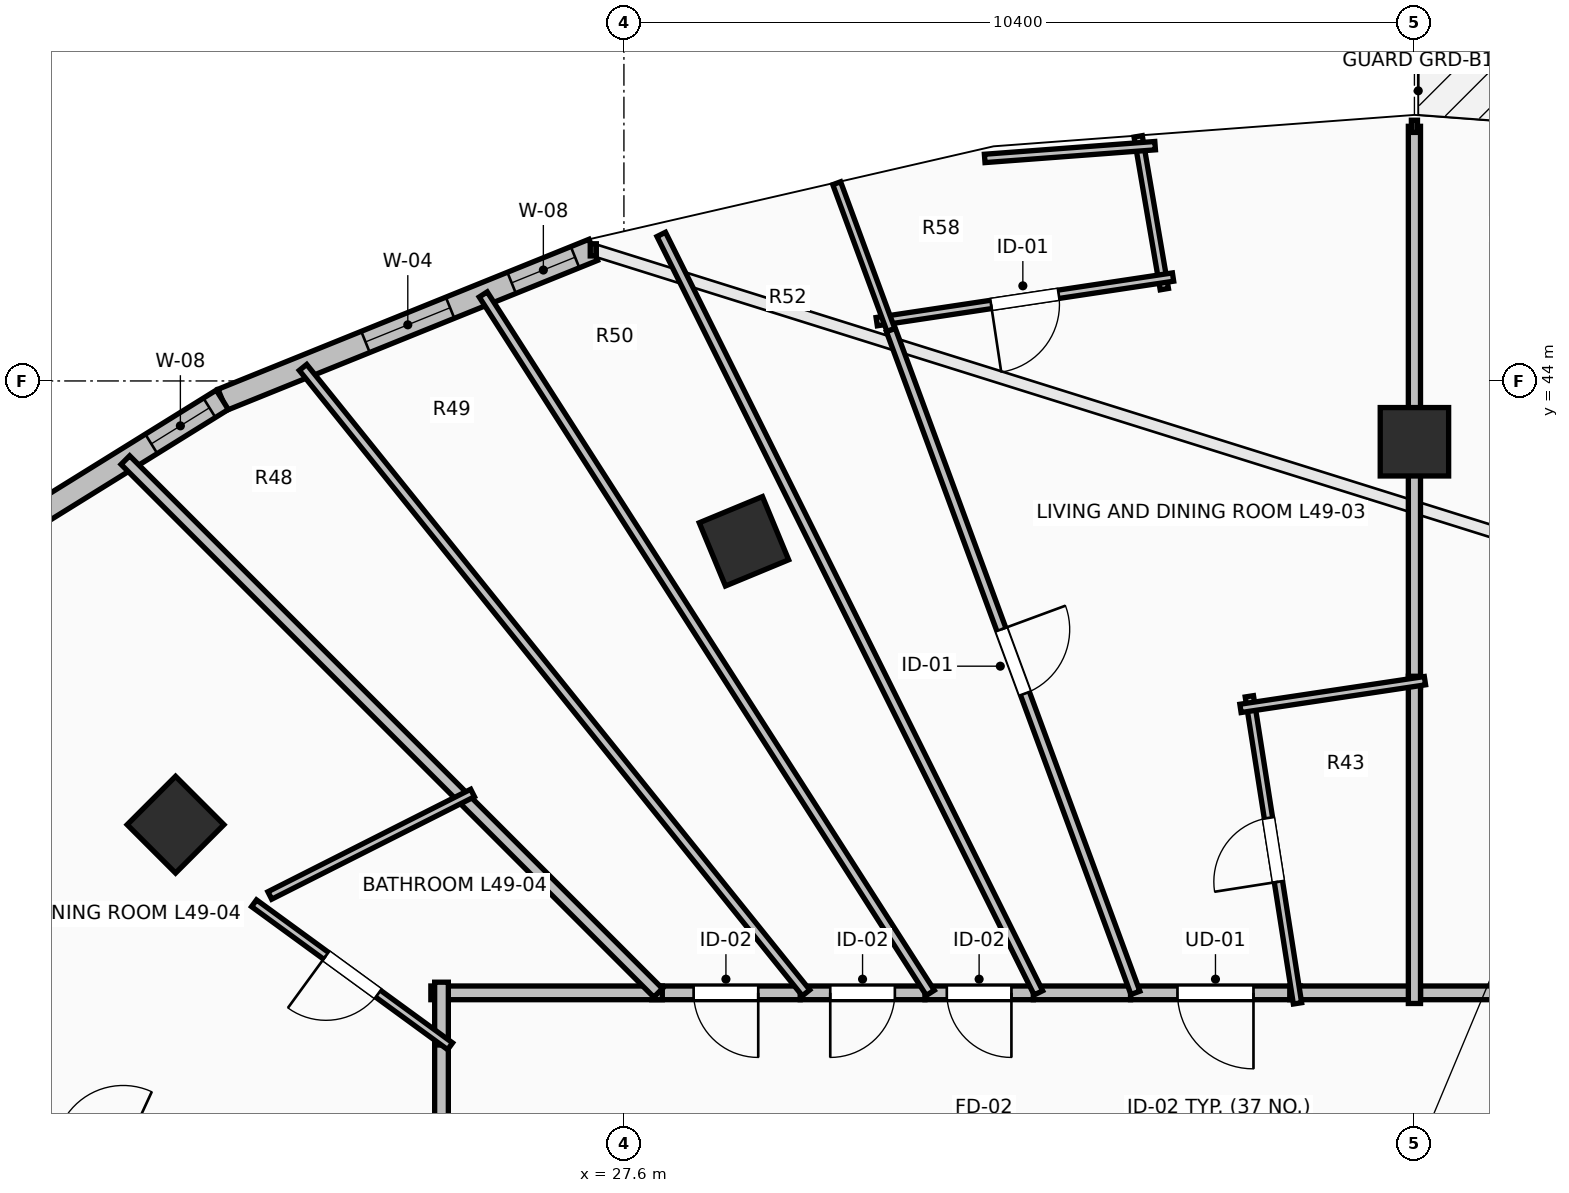
"""IFC4 building model, lengths in metres.
Left out: names, types, materials, properties, quantities, classifications, styles, units other than length and angle.
Written with IfcOpenShell. Run it as: python <this file> out.ifc"""

import sys

from ifc_helpers import new_model, si_unit, direction, frame, frame_2d, origin, origin_2d, place, context, subcontext, project, spatial, rectangle, extrude, element, fill, save


model = new_model("IFC4")
c1 = context("Model", 3, precision=1e-05, world=origin(), true_north=direction((0.0, 1.0)))
c2 = subcontext(c1, "Body", "Model", "MODEL_VIEW")
j1 = project(units=[si_unit("LENGTHUNIT", "METRE"), si_unit("PLANEANGLEUNIT", "RADIAN")], contexts=[c1])
p1 = place(None, origin())
s1 = spatial("IfcSite", under=j1, at=p1, CompositionType="ELEMENT")
p2 = place(p1, origin())
s2 = spatial("IfcBuilding", under=s1, at=p2, CompositionType="ELEMENT")
p3 = place(p2, frame((0.0, 0.0, 182.6)))
s3 = spatial("IfcBuildingStorey", under=s2, at=p3, CompositionType="ELEMENT", Elevation=182.6)
for number, where, z_axis, x_axis in (
    (1, (38.0, 43.2, 0.0), (0.0, 0.0, 1.0), (0.0, 1.0, 0.0)),
    (2, (29.179, 41.891, 0.0), (0.0, 0.0, 1.0), (-0.383, 0.924, 0.0)),
    (3, (21.701, 38.162, 0.0), (0.0, 0.0, 1.0), (-0.707, 0.707, 0.0)),
):
    element("IfcColumn", number, at=place(p3, frame(where, z_axis=z_axis, x_axis=x_axis)), inside=s3, PredefinedType="COLUMN", context=c2, shape_type="SweptSolid", body=[
        extrude(rectangle(XDim=0.9, YDim=0.9, at=origin_2d()), origin(), (0.0, 0.0, 1.0), 3.5),
    ])
p4 = place(p3, frame((27.197, 45.725, 0.0), z_axis=(0.0, 0.0, 1.0), x_axis=(-0.927111094334, -0.374786630981, 0.0)))
e4 = element("IfcWall", 4, at=p4, inside=s3, PredefinedType="STANDARD", context=c2, shape_type="SweptSolid", body=[
    extrude(rectangle(XDim=5.264, YDim=0.3, at=frame_2d((2.632, 0.0))), origin(), (0.0, 0.0, 1.0), 3.24),
])
p5 = place(p4, frame((0.258, 0.0, 0.85)))
e5 = element("IfcOpeningElement", 5, at=p5, cuts=e4, PredefinedType="OPENING", context=c2, shape_type="SweptSolid", body=[
    extrude(rectangle(XDim=0.9, YDim=1.8, at=frame_2d((0.45, 0.9))), frame((0.0, 0.165, 0.0), z_axis=(0.0, -1.0, 0.0), x_axis=(1.0, 0.0, 0.0)), (0.0, 0.0, 1.0), 0.33),
])
p6 = place(p4, frame((2.032, 0.0, 0.85)))
e6 = element("IfcOpeningElement", 6, at=p6, cuts=e4, PredefinedType="OPENING", context=c2, shape_type="SweptSolid", body=[
    extrude(rectangle(XDim=1.2, YDim=1.95, at=frame_2d((0.6, 0.975))), frame((0.0, 0.165, 0.0), z_axis=(0.0, -1.0, 0.0), x_axis=(1.0, 0.0, 0.0)), (0.0, 0.0, 1.0), 0.33),
])
p7 = place(p3, frame((22.316, 43.752, 0.0), z_axis=(0.0, 0.0, 1.0), x_axis=(-0.849647657754, -0.527350791858, 0.0)))
e7 = element("IfcWall", 7, at=p7, inside=s3, PredefinedType="STANDARD", context=c2, shape_type="SweptSolid", body=[
    extrude(rectangle(XDim=5.035, YDim=0.3, at=frame_2d((2.518, 0.0))), origin(), (0.0, 0.0, 1.0), 3.24),
])
p8 = place(p7, frame((0.199, 0.0, 0.85)))
e8 = element("IfcOpeningElement", 8, at=p8, cuts=e7, PredefinedType="OPENING", context=c2, shape_type="SweptSolid", body=[
    extrude(rectangle(XDim=0.9, YDim=1.8, at=frame_2d((0.45, 0.9))), frame((0.0, 0.165, 0.0), z_axis=(0.0, -1.0, 0.0), x_axis=(1.0, 0.0, 0.0)), (0.0, 0.0, 1.0), 0.33),
])
p9 = place(p3, frame((39.197, 35.95, 0.0), z_axis=(0.0, 0.0, 1.0), x_axis=(-1.0, 0.0, 0.0)))
e9 = element("IfcWall", 9, at=p9, inside=s3, PredefinedType="PARTITIONING", context=c2, shape_type="SweptSolid", body=[
    extrude(rectangle(XDim=1.257, YDim=0.18, at=frame_2d((0.628, 0.0))), origin(), (0.0, 0.0, 1.0), 2.922),
])
p10 = place(p3, frame((36.5, 35.95, 0.0), z_axis=(0.0, 0.0, 1.0), x_axis=(-1.0, 0.0, 0.0)))
e10 = element("IfcWall", 10, at=p10, inside=s3, PredefinedType="PARTITIONING", context=c2, shape_type="SweptSolid", body=[
    extrude(rectangle(XDim=2.235, YDim=0.18, at=frame_2d((1.118, 0.0))), origin(), (0.0, 0.0, 1.0), 2.922),
])
p11 = place(p10, frame((0.617, 0.0, 0.0)))
e11 = element("IfcOpeningElement", 11, at=p11, cuts=e10, PredefinedType="OPENING", context=c2, shape_type="SweptSolid", body=[
    extrude(rectangle(XDim=1.0, YDim=2.15, at=frame_2d((0.5, 1.075))), frame((0.0, 0.105, 0.0), z_axis=(0.0, -1.0, 0.0), x_axis=(1.0, 0.0, 0.0)), (0.0, 0.0, 1.0), 0.21),
])
p12 = place(p3, frame((38.08, 35.95, 0.0), z_axis=(0.0, 0.0, 1.0), x_axis=(-1.0, 0.0, 0.0)))
e12 = element("IfcWall", 12, at=p12, inside=s3, PredefinedType="PARTITIONING", context=c2, shape_type="SweptSolid", body=[
    extrude(rectangle(XDim=1.72, YDim=0.18, at=frame_2d((0.86, 0.0))), origin(), (0.0, 0.0, 1.0), 2.922),
])
p13 = place(p3, frame((34.265, 35.95, 0.0), z_axis=(0.0, 0.0, 1.0), x_axis=(-1.0, 0.0, 0.0)))
e13 = element("IfcWall", 13, at=p13, inside=s3, PredefinedType="PARTITIONING", context=c2, shape_type="SweptSolid", body=[
    extrude(rectangle(XDim=1.279, YDim=0.18, at=frame_2d((0.639, 0.0))), origin(), (0.0, 0.0, 1.0), 2.922),
])
p14 = place(p3, frame((32.986, 35.95, 0.0), z_axis=(0.0, 0.0, 1.0), x_axis=(-1.0, 0.0, 0.0)))
e14 = element("IfcWall", 14, at=p14, inside=s3, PredefinedType="PARTITIONING", context=c2, shape_type="SweptSolid", body=[
    extrude(rectangle(XDim=1.426, YDim=0.18, at=frame_2d((0.713, 0.0))), origin(), (0.0, 0.0, 1.0), 3.24),
])
p15 = place(p14, frame((0.288, 0.0, 0.0)))
e15 = element("IfcOpeningElement", 15, at=p15, cuts=e14, PredefinedType="OPENING", context=c2, shape_type="SweptSolid", body=[
    extrude(rectangle(XDim=0.85, YDim=2.1, at=frame_2d((0.425, 1.05))), frame((0.0, 0.105, 0.0), z_axis=(0.0, -1.0, 0.0), x_axis=(1.0, 0.0, 0.0)), (0.0, 0.0, 1.0), 0.21),
])
p16 = place(p3, frame((31.56, 35.95, 0.0), z_axis=(0.0, 0.0, 1.0), x_axis=(-1.0, 0.0, 0.0)))
e16 = element("IfcWall", 16, at=p16, inside=s3, PredefinedType="PARTITIONING", context=c2, shape_type="SweptSolid", body=[
    extrude(rectangle(XDim=1.641, YDim=0.18, at=frame_2d((0.821, 0.0))), origin(), (0.0, 0.0, 1.0), 2.432),
])
p17 = place(p16, frame((0.396, 0.0, 0.0)))
e17 = element("IfcOpeningElement", 17, at=p17, cuts=e16, PredefinedType="OPENING", context=c2, shape_type="SweptSolid", body=[
    extrude(rectangle(XDim=0.85, YDim=2.1, at=frame_2d((0.425, 1.05))), frame((0.0, 0.105, 0.0), z_axis=(0.0, -1.0, 0.0), x_axis=(1.0, 0.0, 0.0)), (0.0, 0.0, 1.0), 0.21),
])
p18 = place(p3, frame((29.919, 35.95, 0.0), z_axis=(0.0, 0.0, 1.0), x_axis=(-1.0, 0.0, 0.0)))
e18 = element("IfcWall", 18, at=p18, inside=s3, PredefinedType="PARTITIONING", context=c2, shape_type="SweptSolid", body=[
    extrude(rectangle(XDim=1.954, YDim=0.18, at=frame_2d((0.977, 0.0))), origin(), (0.0, 0.0, 1.0), 2.432),
])
p19 = place(p18, frame((0.552, 0.0, 0.0)))
e19 = element("IfcOpeningElement", 19, at=p19, cuts=e18, PredefinedType="OPENING", context=c2, shape_type="SweptSolid", body=[
    extrude(rectangle(XDim=0.85, YDim=2.1, at=frame_2d((0.425, 1.05))), frame((0.0, 0.105, 0.0), z_axis=(0.0, -1.0, 0.0), x_axis=(1.0, 0.0, 0.0)), (0.0, 0.0, 1.0), 0.21),
])
p20 = place(p3, frame((25.2, 35.404, 0.0), z_axis=(0.0, 0.0, 1.0), x_axis=(0.0, -1.0, 0.0)))
e20 = element("IfcWall", 20, at=p20, inside=s3, PredefinedType="PARTITIONING", context=c2, shape_type="SweptSolid", body=[
    extrude(rectangle(XDim=3.563, YDim=0.18, at=frame_2d((1.781, 0.0))), origin(), (0.0, 0.0, 1.0), 2.432),
])
p21 = place(p20, frame((1.281, 0.0, 0.0)))
e21 = element("IfcOpeningElement", 21, at=p21, cuts=e20, PredefinedType="OPENING", context=c2, shape_type="SweptSolid", body=[
    extrude(rectangle(XDim=1.0, YDim=2.15, at=frame_2d((0.5, 1.075))), frame((0.0, 0.105, 0.0), z_axis=(0.0, -1.0, 0.0), x_axis=(1.0, 0.0, 0.0)), (0.0, 0.0, 1.0), 0.21),
])
p22 = place(p3, frame((28.105, 35.95, 0.0), z_axis=(0.0, 0.0, 1.0), x_axis=(-1.0, 0.0, 0.0)))
e22 = element("IfcWall", 22, at=p22, inside=s3, PredefinedType="PARTITIONING", context=c2, shape_type="SweptSolid", body=[
    extrude(rectangle(XDim=3.045, YDim=0.18, at=frame_2d((1.522, 0.0))), origin(), (0.0, 0.0, 1.0), 2.432),
])
p23 = place(p3, frame((25.2, 36.09, 0.0), z_axis=(0.0, 0.0, 1.0), x_axis=(0.0, -1.0, 0.0)))
e23 = element("IfcWall", 23, at=p23, inside=s3, PredefinedType="PARTITIONING", context=c2, shape_type="SweptSolid", body=[
    extrude(rectangle(XDim=0.826, YDim=0.18, at=frame_2d((0.413, 0.0))), origin(), (0.0, 0.0, 1.0), 2.432),
])
p24 = place(p3, frame((38.0, 47.35, 0.0), z_axis=(0.0, 0.0, 1.0), x_axis=(0.0, -1.0, 0.0)))
e24 = element("IfcWall", 24, at=p24, inside=s3, PredefinedType="PARTITIONING", context=c2, shape_type="SweptSolid", body=[
    extrude(rectangle(XDim=7.375, YDim=0.16, at=frame_2d((3.688, 0.0))), origin(), (0.0, 0.0, 1.0), 3.24),
])
p25 = place(p3, frame((38.0, 40.115, 0.0), z_axis=(0.0, 0.0, 1.0), x_axis=(0.0, -1.0, 0.0)))
e25 = element("IfcWall", 25, at=p25, inside=s3, PredefinedType="PARTITIONING", context=c2, shape_type="SweptSolid", body=[
    extrude(rectangle(XDim=4.305, YDim=0.16, at=frame_2d((2.152, 0.0))), origin(), (0.0, 0.0, 1.0), 2.874),
])
p26 = place(p3, frame((36.462, 35.812, 0.0), z_axis=(0.0, 0.0, 1.0), x_axis=(-0.154883213323, 0.987932786292, 0.0)))
e26 = element("IfcWall", 26, at=p26, inside=s3, PredefinedType="PARTITIONING", context=c2, shape_type="SweptSolid", body=[
    extrude(rectangle(XDim=4.089, YDim=0.11, at=frame_2d((2.044, 0.0))), origin(), (0.0, 0.0, 1.0), 2.874),
])
p27 = place(p26, frame((1.619, 0.0, 0.0)))
e27 = element("IfcOpeningElement", 27, at=p27, cuts=e26, PredefinedType="OPENING", context=c2, shape_type="SweptSolid", body=[
    extrude(rectangle(XDim=0.85, YDim=2.1, at=frame_2d((0.425, 1.05))), frame((0.0, 0.07, 0.0), z_axis=(0.0, -1.0, 0.0), x_axis=(1.0, 0.0, 0.0)), (0.0, 0.0, 1.0), 0.14),
])
p28 = place(p3, frame((35.712, 39.692, 0.0), z_axis=(0.0, 0.0, 1.0), x_axis=(0.988892526147, 0.148632337431, 0.0)))
e28 = element("IfcWall", 28, at=p28, inside=s3, PredefinedType="PARTITIONING", context=c2, shape_type="SweptSolid", body=[
    extrude(rectangle(XDim=2.454, YDim=0.11, at=frame_2d((1.227, 0.0))), origin(), (0.0, 0.0, 1.0), 3.24),
])
p29 = place(p3, frame((34.365, 47.218, 0.0), z_axis=(0.0, 0.0, 1.0), x_axis=(0.168804313657, -0.985649584635, 0.0)))
e29 = element("IfcWall", 29, at=p29, inside=s3, PredefinedType="PARTITIONING", context=c2, shape_type="SweptSolid", body=[
    extrude(rectangle(XDim=2.039, YDim=0.11, at=frame_2d((1.02, 0.0))), origin(), (0.0, 0.0, 1.0), 3.24),
])
p30 = place(p3, frame((34.824, 45.367, 0.0), z_axis=(0.0, 0.0, 1.0), x_axis=(-0.988877230123, -0.148734070555, 0.0)))
e30 = element("IfcWall", 30, at=p30, inside=s3, PredefinedType="PARTITIONING", context=c2, shape_type="SweptSolid", body=[
    extrude(rectangle(XDim=3.943, YDim=0.11, at=frame_2d((1.971, 0.0))), origin(), (0.0, 0.0, 1.0), 3.24),
])
p31 = place(p30, frame((1.521, 0.0, 0.0)))
e31 = element("IfcOpeningElement", 31, at=p31, cuts=e30, PredefinedType="OPENING", context=c2, shape_type="SweptSolid", body=[
    extrude(rectangle(XDim=0.9, YDim=2.1, at=frame_2d((0.45, 1.05))), frame((0.0, 0.07, 0.0), z_axis=(0.0, -1.0, 0.0), x_axis=(1.0, 0.0, 0.0)), (0.0, 0.0, 1.0), 0.14),
])
p32 = place(p3, frame((31.113, 44.67, 0.0), z_axis=(0.0, 0.0, 1.0), x_axis=(-0.346337161188, 0.938110105894, 0.0)))
e32 = element("IfcWall", 32, at=p32, inside=s3, PredefinedType="PARTITIONING", context=c2, shape_type="SweptSolid", body=[
    extrude(rectangle(XDim=2.059, YDim=0.11, at=frame_2d((1.03, 0.0))), origin(), (0.0, 0.0, 1.0), 3.24),
])
p33 = place(p3, frame((34.589, 47.095, 0.0), z_axis=(0.0, 0.0, 1.0), x_axis=(-0.997205784552, -0.074703569226, 0.0)))
e33 = element("IfcWall", 33, at=p33, inside=s3, PredefinedType="PARTITIONING", context=c2, shape_type="SweptSolid", body=[
    extrude(rectangle(XDim=2.249, YDim=0.11, at=frame_2d((1.124, 0.0))), origin(), (0.0, 0.0, 1.0), 3.24),
])
p34 = place(p3, frame((31.112, 44.67, 0.0), z_axis=(0.0, 0.0, 1.0), x_axis=(0.346109472243, -0.938194134081, 0.0)))
e34 = element("IfcWall", 34, at=p34, inside=s3, PredefinedType="PARTITIONING", context=c2, shape_type="SweptSolid", body=[
    extrude(rectangle(XDim=9.294, YDim=0.125, at=frame_2d((4.647, 0.0))), origin(), (0.0, 0.0, 1.0), 2.432),
])
p35 = place(p34, frame((4.197, 0.0, 0.0)))
e35 = element("IfcOpeningElement", 35, at=p35, cuts=e34, PredefinedType="OPENING", context=c2, shape_type="SweptSolid", body=[
    extrude(rectangle(XDim=0.9, YDim=2.1, at=frame_2d((0.45, 1.05))), frame((0.0, 0.077, 0.0), z_axis=(0.0, -1.0, 0.0), x_axis=(1.0, 0.0, 0.0)), (0.0, 0.0, 1.0), 0.155),
])
p36 = place(p3, frame((28.091, 45.928, 0.0), z_axis=(0.0, 0.0, 1.0), x_axis=(0.445267068418, -0.895397809793, 0.0)))
e36 = element("IfcWall", 36, at=p36, inside=s3, PredefinedType="PARTITIONING", context=c2, shape_type="SweptSolid", body=[
    extrude(rectangle(XDim=11.144, YDim=0.125, at=frame_2d((5.572, 0.0))), origin(), (0.0, 0.0, 1.0), 2.432),
])
p37 = place(p3, frame((25.749, 45.138, 0.0), z_axis=(0.0, 0.0, 1.0), x_axis=(0.539168632786, -0.842197830335, 0.0)))
e37 = element("IfcWall", 37, at=p37, inside=s3, PredefinedType="PARTITIONING", context=c2, shape_type="SweptSolid", body=[
    extrude(rectangle(XDim=10.909, YDim=0.125, at=frame_2d((5.455, 0.0))), origin(), (0.0, 0.0, 1.0), 2.432),
])
p38 = place(p3, frame((23.378, 44.178, 0.0), z_axis=(0.0, 0.0, 1.0), x_axis=(0.626756813732, -0.779214923137, 0.0)))
e38 = element("IfcWall", 38, at=p38, inside=s3, PredefinedType="PARTITIONING", context=c2, shape_type="SweptSolid", body=[
    extrude(rectangle(XDim=10.559, YDim=0.125, at=frame_2d((5.28, 0.0))), origin(), (0.0, 0.0, 1.0), 2.432),
])
p39 = place(p3, frame((21.041, 42.959, 0.0), z_axis=(0.0, 0.0, 1.0), x_axis=(0.707106781187, -0.707106781187, 0.0)))
e39 = element("IfcWall", 39, at=p39, inside=s3, PredefinedType="PARTITIONING", context=c2, shape_type="SweptSolid", body=[
    extrude(rectangle(XDim=9.912, YDim=0.16, at=frame_2d((4.956, 0.0))), origin(), (0.0, 0.0, 1.0), 2.432),
])
p40 = place(p3, frame((25.313, 35.248, 0.0), z_axis=(0.0, 0.0, 1.0), x_axis=(-0.807968083988, 0.58922625133, 0.0)))
e40 = element("IfcWall", 40, at=p40, inside=s3, PredefinedType="PARTITIONING", context=c2, shape_type="SweptSolid", body=[
    extrude(rectangle(XDim=3.192, YDim=0.11, at=frame_2d((1.596, 0.0))), origin(), (0.0, 0.0, 1.0), 2.432),
])
p41 = place(p40, frame((1.171, 0.0, 0.0)))
e41 = element("IfcOpeningElement", 41, at=p41, cuts=e40, PredefinedType="OPENING", context=c2, shape_type="SweptSolid", body=[
    extrude(rectangle(XDim=0.85, YDim=2.1, at=frame_2d((0.425, 1.05))), frame((0.0, 0.07, 0.0), z_axis=(0.0, -1.0, 0.0), x_axis=(1.0, 0.0, 0.0)), (0.0, 0.0, 1.0), 0.14),
])
p42 = place(p3, frame((22.941, 37.231, 0.0), z_axis=(0.0, 0.0, 1.0), x_axis=(0.892507731149, 0.451032094024, 0.0)))
e42 = element("IfcWall", 42, at=p42, inside=s3, PredefinedType="PARTITIONING", context=c2, shape_type="SweptSolid", body=[
    extrude(rectangle(XDim=2.989, YDim=0.11, at=frame_2d((1.495, 0.0))), origin(), (0.0, 0.0, 1.0), 2.432),
])
p43 = place(p3, frame((16.006, 36.139, 0.0), z_axis=(0.0, 0.0, 1.0), x_axis=(0.908157621609, -0.41862839645, 0.0)))
e43 = element("IfcWall", 43, at=p43, inside=s3, PredefinedType="PARTITIONING", context=c2, shape_type="SweptSolid", body=[
    extrude(rectangle(XDim=10.124, YDim=0.125, at=frame_2d((5.062, 0.0))), origin(), (0.0, 0.0, 1.0), 2.774),
])
p44 = place(p43, frame((4.612, 0.0, 0.0)))
e44 = element("IfcOpeningElement", 44, at=p44, cuts=e43, PredefinedType="OPENING", context=c2, shape_type="SweptSolid", body=[
    extrude(rectangle(XDim=0.9, YDim=2.1, at=frame_2d((0.45, 1.05))), frame((0.0, 0.077, 0.0), z_axis=(0.0, -1.0, 0.0), x_axis=(1.0, 0.0, 0.0)), (0.0, 0.0, 1.0), 0.155),
])
p45 = place(p3, frame((12.609, 35.141, 0.0), z_axis=(0.0, 0.0, 1.0), x_axis=(0.940877411069, -0.338747246985, 0.0)))
e45 = element("IfcWall", 45, at=p45, inside=s3, PredefinedType="PARTITIONING", context=c2, shape_type="SweptSolid", body=[
    extrude(rectangle(XDim=13.382, YDim=0.125, at=frame_2d((6.691, 0.0))), origin(), (0.0, 0.0, 1.0), 2.774),
])
p46 = place(p45, frame((6.266, 0.0, 0.0)))
e46 = element("IfcOpeningElement", 46, at=p46, cuts=e45, PredefinedType="OPENING", context=c2, shape_type="SweptSolid", body=[
    extrude(rectangle(XDim=0.85, YDim=2.1, at=frame_2d((0.425, 1.05))), frame((0.0, 0.077, 0.0), z_axis=(0.0, -1.0, 0.0), x_axis=(1.0, 0.0, 0.0)), (0.0, 0.0, 1.0), 0.155),
])
p47 = place(p5, origin())
e47 = element("IfcWindow", 47, at=p47, inside=s3, PartitioningType="SINGLE_PANEL", PredefinedType="WINDOW", context=c2, shape_type="SweptSolid", body=[
    extrude(rectangle(XDim=0.9, YDim=1.8, at=frame_2d((0.45, 0.9))), frame((0.0, 0.03, 0.0), z_axis=(0.0, -1.0, 0.0), x_axis=(1.0, 0.0, 0.0)), (0.0, 0.0, 1.0), 0.06),
])
fill(e5, e47)
p48 = place(p6, origin())
e48 = element("IfcWindow", 48, at=p48, inside=s3, PartitioningType="SINGLE_PANEL", PredefinedType="WINDOW", context=c2, shape_type="SweptSolid", body=[
    extrude(rectangle(XDim=1.2, YDim=1.95, at=frame_2d((0.6, 0.975))), frame((0.0, 0.03, 0.0), z_axis=(0.0, -1.0, 0.0), x_axis=(1.0, 0.0, 0.0)), (0.0, 0.0, 1.0), 0.06),
])
fill(e6, e48)
p49 = place(p8, origin())
e49 = element("IfcWindow", 49, at=p49, inside=s3, PartitioningType="SINGLE_PANEL", PredefinedType="WINDOW", context=c2, shape_type="SweptSolid", body=[
    extrude(rectangle(XDim=0.9, YDim=1.8, at=frame_2d((0.45, 0.9))), frame((0.0, 0.03, 0.0), z_axis=(0.0, -1.0, 0.0), x_axis=(1.0, 0.0, 0.0)), (0.0, 0.0, 1.0), 0.06),
])
fill(e8, e49)
p50 = place(p11, origin())
e50 = element("IfcDoor", 50, at=p50, inside=s3, OperationType="SINGLE_SWING_LEFT", PredefinedType="DOOR", context=c2, shape_type="SweptSolid", body=[
    extrude(rectangle(XDim=1.0, YDim=2.15, at=frame_2d((0.5, 1.075))), frame((0.0, 0.025, 0.0), z_axis=(0.0, -1.0, 0.0), x_axis=(1.0, 0.0, 0.0)), (0.0, 0.0, 1.0), 0.05),
])
fill(e11, e50)
p51 = place(p27, origin())
e51 = element("IfcDoor", 51, at=p51, inside=s3, OperationType="SINGLE_SWING_LEFT", PredefinedType="DOOR", context=c2, shape_type="SweptSolid", body=[
    extrude(rectangle(XDim=0.85, YDim=2.1, at=frame_2d((0.425, 1.05))), frame((0.0, 0.025, 0.0), z_axis=(0.0, -1.0, 0.0), x_axis=(1.0, 0.0, 0.0)), (0.0, 0.0, 1.0), 0.05),
])
fill(e27, e51)
p52 = place(p31, origin())
e52 = element("IfcDoor", 52, at=p52, inside=s3, OperationType="SINGLE_SWING_RIGHT", PredefinedType="DOOR", context=c2, shape_type="SweptSolid", body=[
    extrude(rectangle(XDim=0.9, YDim=2.1, at=frame_2d((0.45, 1.05))), frame((0.0, 0.025, 0.0), z_axis=(0.0, -1.0, 0.0), x_axis=(1.0, 0.0, 0.0)), (0.0, 0.0, 1.0), 0.05),
])
fill(e31, e52)
p53 = place(p35, origin())
e53 = element("IfcDoor", 53, at=p53, inside=s3, OperationType="SINGLE_SWING_LEFT", PredefinedType="DOOR", context=c2, shape_type="SweptSolid", body=[
    extrude(rectangle(XDim=0.9, YDim=2.1, at=frame_2d((0.45, 1.05))), frame((0.0, 0.025, 0.0), z_axis=(0.0, -1.0, 0.0), x_axis=(1.0, 0.0, 0.0)), (0.0, 0.0, 1.0), 0.05),
])
fill(e35, e53)
p54 = place(p41, origin())
e54 = element("IfcDoor", 54, at=p54, inside=s3, OperationType="SINGLE_SWING_RIGHT", PredefinedType="DOOR", context=c2, shape_type="SweptSolid", body=[
    extrude(rectangle(XDim=0.85, YDim=2.1, at=frame_2d((0.425, 1.05))), frame((0.0, 0.025, 0.0), z_axis=(0.0, -1.0, 0.0), x_axis=(1.0, 0.0, 0.0)), (0.0, 0.0, 1.0), 0.05),
])
fill(e41, e54)
p55 = place(p15, origin())
e55 = element("IfcDoor", 55, at=p55, inside=s3, OperationType="SINGLE_SWING_LEFT", PredefinedType="DOOR", context=c2, shape_type="SweptSolid", body=[
    extrude(rectangle(XDim=0.85, YDim=2.1, at=frame_2d((0.425, 1.05))), frame((0.0, 0.025, 0.0), z_axis=(0.0, -1.0, 0.0), x_axis=(1.0, 0.0, 0.0)), (0.0, 0.0, 1.0), 0.05),
])
fill(e15, e55)
p56 = place(p17, origin())
e56 = element("IfcDoor", 56, at=p56, inside=s3, OperationType="SINGLE_SWING_RIGHT", PredefinedType="DOOR", context=c2, shape_type="SweptSolid", body=[
    extrude(rectangle(XDim=0.85, YDim=2.1, at=frame_2d((0.425, 1.05))), frame((0.0, 0.025, 0.0), z_axis=(0.0, -1.0, 0.0), x_axis=(1.0, 0.0, 0.0)), (0.0, 0.0, 1.0), 0.05),
])
fill(e17, e56)
p57 = place(p19, origin())
e57 = element("IfcDoor", 57, at=p57, inside=s3, OperationType="SINGLE_SWING_LEFT", PredefinedType="DOOR", context=c2, shape_type="SweptSolid", body=[
    extrude(rectangle(XDim=0.85, YDim=2.1, at=frame_2d((0.425, 1.05))), frame((0.0, 0.025, 0.0), z_axis=(0.0, -1.0, 0.0), x_axis=(1.0, 0.0, 0.0)), (0.0, 0.0, 1.0), 0.05),
])
fill(e19, e57)
save(model, sys.argv[1])
